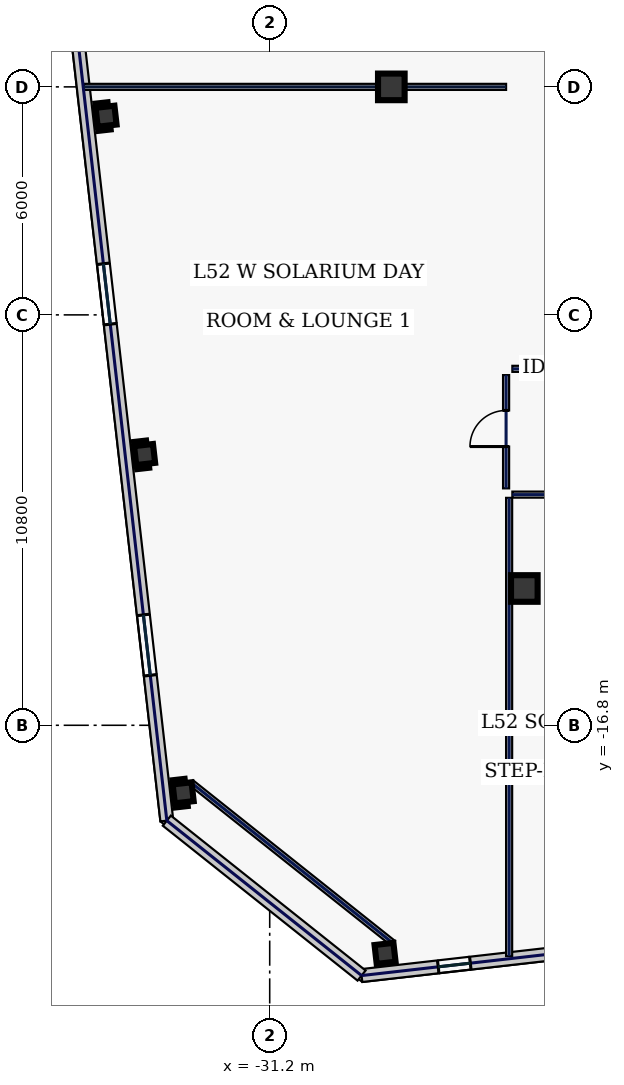
"""IFC4 building model, lengths in metres.
Left out: names, types, materials, properties, quantities, classifications, styles, units other than length and angle.
Written with IfcOpenShell. Run it as: python <this file> out.ifc"""

import sys

from ifc_helpers import new_model, si_unit, direction, frame, frame_2d, origin, origin_2d, place, context, subcontext, project, spatial, rectangle, hollow_rectangle, extrude, element, fill, save


model = new_model("IFC4")
c1 = context("Model", 3, precision=1e-05, world=origin(), true_north=direction((0.0, 1.0)))
c2 = subcontext(c1, "Body", "Model", "MODEL_VIEW")
j1 = project(units=[si_unit("LENGTHUNIT", "METRE"), si_unit("PLANEANGLEUNIT", "RADIAN")], contexts=[c1])
p1 = place(None, origin())
s1 = spatial("IfcSite", under=j1, at=p1, CompositionType="ELEMENT")
p2 = place(p1, origin())
s2 = spatial("IfcBuilding", under=s1, at=p2, CompositionType="ELEMENT")
p3 = place(p2, frame((0.0, 0.0, 226.2)))
s3 = spatial("IfcBuildingStorey", under=s2, at=p3, CompositionType="ELEMENT", Elevation=226.2)
for number, where, z_axis, x_axis in (
    (1, (-24.5, -13.2, 0.0), (0.0, 0.0, 1.0), (1.0, 0.0, 0.0)),
    (2, (-28.0, 0.0, 0.0), (0.0, 0.0, 1.0), (1.0, 0.0, 0.0)),
):
    element("IfcColumn", number, at=place(p3, frame(where, z_axis=z_axis, x_axis=x_axis)), inside=s3, PredefinedType="COLUMN", context=c2, shape_type="SweptSolid", body=[
        extrude(hollow_rectangle(XDim=0.7, YDim=0.7, WallThickness=0.032, at=origin_2d()), origin(), (0.0, 0.0, 1.0), 3.74),
    ])
for number, where, z_axis, x_axis in (
    (3, (-28.165, -22.802, 0.0), (0.0, 0.0, 1.0), (0.994, 0.113, 0.0)),
    (4, (-35.506, -0.772, 0.0), (0.0, 0.0, 1.0), (0.994, 0.113, 0.0)),
    (5, (-34.491, -9.674, 0.0), (0.0, 0.0, 1.0), (0.994, 0.113, 0.0)),
    (6, (-33.477, -18.577, 0.0), (0.0, 0.0, 1.0), (0.994, 0.113, 0.0)),
):
    element("IfcColumn", number, at=place(p3, frame(where, z_axis=z_axis, x_axis=x_axis)), inside=s3, PredefinedType="COLUMN", context=c2, shape_type="SweptSolid", body=[
        extrude(hollow_rectangle(XDim=0.5, YDim=0.5, WallThickness=0.025, at=origin_2d()), origin(), (0.0, 0.0, 1.0), 3.74),
    ])
p4 = place(p3, frame((-28.783, -23.386, 0.0), z_axis=(0.0, 0.0, 1.0), x_axis=(0.993572262951, 0.113199639106, 0.0)))
e7 = element("IfcWall", 7, at=p4, inside=s3, PredefinedType="STANDARD", context=c2, shape_type="SweptSolid", body=[
    extrude(rectangle(XDim=14.15, YDim=0.34, at=frame_2d((7.075, 0.0))), origin(), (0.0, 0.0, 1.0), 3.74),
])
p5 = place(p4, frame((2.03, 0.0, 0.88)))
e8 = element("IfcOpeningElement", 8, at=p5, cuts=e7, PredefinedType="OPENING", context=c2, shape_type="SweptSolid", body=[
    extrude(rectangle(XDim=0.85, YDim=1.85, at=frame_2d((0.425, 0.925))), frame((0.0, 0.18, 0.0), z_axis=(0.0, -1.0, 0.0), x_axis=(1.0, 0.0, 0.0)), (0.0, 0.0, 1.0), 0.36),
])
p6 = place(p4, frame((5.779, 0.0, 0.88)))
e9 = element("IfcOpeningElement", 9, at=p6, cuts=e7, PredefinedType="OPENING", context=c2, shape_type="SweptSolid", body=[
    extrude(rectangle(XDim=1.7, YDim=1.95, at=frame_2d((0.85, 0.975))), frame((0.0, 0.18, 0.0), z_axis=(0.0, -1.0, 0.0), x_axis=(1.0, 0.0, 0.0)), (0.0, 0.0, 1.0), 0.36),
])
p7 = place(p4, frame((10.179, 0.0, 0.88)))
e10 = element("IfcOpeningElement", 10, at=p7, cuts=e7, PredefinedType="OPENING", context=c2, shape_type="SweptSolid", body=[
    extrude(rectangle(XDim=1.7, YDim=1.95, at=frame_2d((0.85, 0.975))), frame((0.0, 0.18, 0.0), z_axis=(0.0, -1.0, 0.0), x_axis=(1.0, 0.0, 0.0)), (0.0, 0.0, 1.0), 0.36),
])
p8 = place(p3, frame((-38.118, 17.651, 0.0), z_axis=(0.0, 0.0, 1.0), x_axis=(0.11320360501, -0.9935718111, 0.0)))
e11 = element("IfcWall", 11, at=p8, inside=s3, PredefinedType="STANDARD", context=c2, shape_type="SweptSolid", body=[
    extrude(rectangle(XDim=37.2, YDim=0.34, at=frame_2d((18.6, 0.0))), origin(), (0.0, 0.0, 1.0), 3.74),
])
p9 = place(p8, frame((3.85, 0.0, 0.58)))
e12 = element("IfcOpeningElement", 12, at=p9, cuts=e11, PredefinedType="OPENING", context=c2, shape_type="SweptSolid", body=[
    extrude(rectangle(XDim=1.6, YDim=2.3, at=frame_2d((0.8, 1.15))), frame((0.0, 0.18, 0.0), z_axis=(0.0, -1.0, 0.0), x_axis=(1.0, 0.0, 0.0)), (0.0, 0.0, 1.0), 0.36),
])
p10 = place(p8, frame((13.15, 0.0, 0.58)))
e13 = element("IfcOpeningElement", 13, at=p10, cuts=e11, PredefinedType="OPENING", context=c2, shape_type="SweptSolid", body=[
    extrude(rectangle(XDim=1.6, YDim=2.3, at=frame_2d((0.8, 1.15))), frame((0.0, 0.18, 0.0), z_axis=(0.0, -1.0, 0.0), x_axis=(1.0, 0.0, 0.0)), (0.0, 0.0, 1.0), 0.36),
])
p11 = place(p8, frame((22.45, 0.0, 0.58)))
e14 = element("IfcOpeningElement", 14, at=p11, cuts=e11, PredefinedType="OPENING", context=c2, shape_type="SweptSolid", body=[
    extrude(rectangle(XDim=1.6, YDim=2.3, at=frame_2d((0.8, 1.15))), frame((0.0, 0.18, 0.0), z_axis=(0.0, -1.0, 0.0), x_axis=(1.0, 0.0, 0.0)), (0.0, 0.0, 1.0), 0.36),
])
p12 = place(p8, frame((31.75, 0.0, 0.58)))
e15 = element("IfcOpeningElement", 15, at=p12, cuts=e11, PredefinedType="OPENING", context=c2, shape_type="SweptSolid", body=[
    extrude(rectangle(XDim=1.6, YDim=2.3, at=frame_2d((0.8, 1.15))), frame((0.0, 0.18, 0.0), z_axis=(0.0, -1.0, 0.0), x_axis=(1.0, 0.0, 0.0)), (0.0, 0.0, 1.0), 0.36),
])
p13 = place(p3, frame((-33.907, -19.31, 0.0), z_axis=(0.0, 0.0, 1.0), x_axis=(0.782611787794, -0.622510071892, 0.0)))
e16 = element("IfcWall", 16, at=p13, inside=s3, PredefinedType="STANDARD", context=c2, shape_type="SweptSolid", body=[
    extrude(rectangle(XDim=6.548, YDim=0.34, at=frame_2d((3.274, 0.0))), origin(), (0.0, 0.0, 1.0), 3.74),
])
p14 = place(p3, frame((-33.265, -18.311, 0.0), z_axis=(0.0, 0.0, 1.0), x_axis=(0.782602647064, -0.622521563328, 0.0)))
e17 = element("IfcWall", 17, at=p14, inside=s3, PredefinedType="PARTITIONING", context=c2, shape_type="SweptSolid", body=[
    extrude(rectangle(XDim=6.788, YDim=0.16, at=frame_2d((3.394, 0.0))), origin(), (0.0, 0.0, 1.0), 3.74),
])
p15 = place(p3, frame((-24.98, -10.565, 0.0), z_axis=(0.0, 0.0, 1.0), x_axis=(0.0, 1.0, 0.0)))
e18 = element("IfcWall", 18, at=p15, inside=s3, PredefinedType="PARTITIONING", context=c2, shape_type="SweptSolid", body=[
    extrude(rectangle(XDim=2.98, YDim=0.16, at=frame_2d((1.49, 0.0))), origin(), (0.0, 0.0, 1.0), 3.74),
])
p16 = place(p15, frame((1.1, 0.0, 0.0)))
e19 = element("IfcOpeningElement", 19, at=p16, cuts=e18, PredefinedType="OPENING", context=c2, shape_type="SweptSolid", body=[
    extrude(rectangle(XDim=0.95, YDim=2.2, at=frame_2d((0.475, 1.1))), frame((0.0, 0.09, 0.0), z_axis=(0.0, -1.0, 0.0), x_axis=(1.0, 0.0, 0.0)), (0.0, 0.0, 1.0), 0.18),
])
p17 = place(p3, frame((-24.815, -7.42, 0.0), z_axis=(0.0, 0.0, 1.0), x_axis=(1.0, 0.0, 0.0)))
e20 = element("IfcWall", 20, at=p17, inside=s3, PredefinedType="PARTITIONING", context=c2, shape_type="SweptSolid", body=[
    extrude(rectangle(XDim=14.1, YDim=0.16, at=frame_2d((7.05, 0.0))), origin(), (0.0, 0.0, 1.0), 3.74),
])
p18 = place(p3, frame((24.815, -10.73, 0.0), z_axis=(0.0, 0.0, 1.0), x_axis=(-1.0, 0.0, 0.0)))
e21 = element("IfcWall", 21, at=p18, inside=s3, PredefinedType="PARTITIONING", context=c2, shape_type="SweptSolid", body=[
    extrude(rectangle(XDim=49.63, YDim=0.16, at=frame_2d((24.815, 0.0))), origin(), (0.0, 0.0, 1.0), 3.74),
])
p19 = place(p18, frame((46.631, 0.0, 0.0)))
e22 = element("IfcOpeningElement", 22, at=p19, cuts=e21, PredefinedType="OPENING", context=c2, shape_type="SweptSolid", body=[
    extrude(rectangle(XDim=1.45, YDim=2.2, at=frame_2d((0.725, 1.1))), frame((0.0, 0.09, 0.0), z_axis=(0.0, -1.0, 0.0), x_axis=(1.0, 0.0, 0.0)), (0.0, 0.0, 1.0), 0.18),
])
p20 = place(p18, frame((42.13, 0.0, 0.0)))
e23 = element("IfcOpeningElement", 23, at=p20, cuts=e21, PredefinedType="OPENING", context=c2, shape_type="SweptSolid", body=[
    extrude(rectangle(XDim=0.95, YDim=2.2, at=frame_2d((0.475, 1.1))), frame((0.0, 0.09, 0.0), z_axis=(0.0, -1.0, 0.0), x_axis=(1.0, 0.0, 0.0)), (0.0, 0.0, 1.0), 0.18),
])
p21 = place(p18, frame((33.74, 0.0, 0.0)))
e24 = element("IfcOpeningElement", 24, at=p21, cuts=e21, PredefinedType="OPENING", context=c2, shape_type="SweptSolid", body=[
    extrude(rectangle(XDim=0.95, YDim=2.2, at=frame_2d((0.475, 1.1))), frame((0.0, 0.09, 0.0), z_axis=(0.0, -1.0, 0.0), x_axis=(1.0, 0.0, 0.0)), (0.0, 0.0, 1.0), 0.18),
])
p22 = place(p18, frame((25.79, 0.0, 0.0)))
e25 = element("IfcOpeningElement", 25, at=p22, cuts=e21, PredefinedType="OPENING", context=c2, shape_type="SweptSolid", body=[
    extrude(rectangle(XDim=1.05, YDim=2.2, at=frame_2d((0.525, 1.1))), frame((0.0, 0.09, 0.0), z_axis=(0.0, -1.0, 0.0), x_axis=(1.0, 0.0, 0.0)), (0.0, 0.0, 1.0), 0.18),
])
p23 = place(p18, frame((16.9, 0.0, 0.0)))
e26 = element("IfcOpeningElement", 26, at=p23, cuts=e21, PredefinedType="OPENING", context=c2, shape_type="SweptSolid", body=[
    extrude(rectangle(XDim=1.3, YDim=2.2, at=frame_2d((0.65, 1.1))), frame((0.0, 0.09, 0.0), z_axis=(0.0, -1.0, 0.0), x_axis=(1.0, 0.0, 0.0)), (0.0, 0.0, 1.0), 0.18),
])
p24 = place(p18, frame((8.4, 0.0, 0.0)))
e27 = element("IfcOpeningElement", 27, at=p24, cuts=e21, PredefinedType="OPENING", context=c2, shape_type="SweptSolid", body=[
    extrude(rectangle(XDim=1.3, YDim=2.2, at=frame_2d((0.65, 1.1))), frame((0.0, 0.09, 0.0), z_axis=(0.0, -1.0, 0.0), x_axis=(1.0, 0.0, 0.0)), (0.0, 0.0, 1.0), 0.18),
])
p25 = place(p18, frame((2.219, 0.0, 0.0)))
e28 = element("IfcOpeningElement", 28, at=p25, cuts=e21, PredefinedType="OPENING", context=c2, shape_type="SweptSolid", body=[
    extrude(rectangle(XDim=0.95, YDim=2.2, at=frame_2d((0.475, 1.1))), frame((0.0, 0.09, 0.0), z_axis=(0.0, -1.0, 0.0), x_axis=(1.0, 0.0, 0.0)), (0.0, 0.0, 1.0), 0.18),
])
p26 = place(p3, frame((-24.9, -22.873, 0.0), z_axis=(0.0, 0.0, 1.0), x_axis=(0.0, 1.0, 0.0)))
e29 = element("IfcWall", 29, at=p26, inside=s3, PredefinedType="PARTITIONING", context=c2, shape_type="SweptSolid", body=[
    extrude(rectangle(XDim=12.058, YDim=0.16, at=frame_2d((6.029, 0.0))), origin(), (0.0, 0.0, 1.0), 3.74),
])
p27 = place(p3, frame((-36.087, 0.0, 0.0), z_axis=(0.0, 0.0, 1.0), x_axis=(1.0, 0.0, 0.0)))
e30 = element("IfcWall", 30, at=p27, inside=s3, PredefinedType="PARTITIONING", context=c2, shape_type="SweptSolid", body=[
    extrude(rectangle(XDim=11.107, YDim=0.16, at=frame_2d((5.553, 0.0))), origin(), (0.0, 0.0, 1.0), 2.135),
])
p28 = place(p5, origin())
e31 = element("IfcWindow", 31, at=p28, inside=s3, PartitioningType="SINGLE_PANEL", PredefinedType="WINDOW", context=c2, shape_type="SweptSolid", body=[
    extrude(rectangle(XDim=0.85, YDim=1.85, at=frame_2d((0.425, 0.925))), frame((0.0, 0.03, 0.0), z_axis=(0.0, -1.0, 0.0), x_axis=(1.0, 0.0, 0.0)), (0.0, 0.0, 1.0), 0.06),
])
fill(e8, e31)
p29 = place(p11, origin())
e32 = element("IfcWindow", 32, at=p29, inside=s3, PartitioningType="SINGLE_PANEL", PredefinedType="WINDOW", context=c2, shape_type="SweptSolid", body=[
    extrude(rectangle(XDim=1.6, YDim=2.3, at=frame_2d((0.8, 1.15))), frame((0.0, 0.03, 0.0), z_axis=(0.0, -1.0, 0.0), x_axis=(1.0, 0.0, 0.0)), (0.0, 0.0, 1.0), 0.06),
])
fill(e14, e32)
p30 = place(p12, origin())
e33 = element("IfcWindow", 33, at=p30, inside=s3, PartitioningType="SINGLE_PANEL", PredefinedType="WINDOW", context=c2, shape_type="SweptSolid", body=[
    extrude(rectangle(XDim=1.6, YDim=2.3, at=frame_2d((0.8, 1.15))), frame((0.0, 0.03, 0.0), z_axis=(0.0, -1.0, 0.0), x_axis=(1.0, 0.0, 0.0)), (0.0, 0.0, 1.0), 0.06),
])
fill(e15, e33)
p31 = place(p16, origin())
e34 = element("IfcDoor", 34, at=p31, inside=s3, OperationType="SINGLE_SWING_LEFT", PredefinedType="DOOR", context=c2, shape_type="SweptSolid", body=[
    extrude(rectangle(XDim=0.95, YDim=2.2, at=frame_2d((0.475, 1.1))), frame((0.0, 0.025, 0.0), z_axis=(0.0, -1.0, 0.0), x_axis=(1.0, 0.0, 0.0)), (0.0, 0.0, 1.0), 0.05),
])
fill(e19, e34)
save(model, sys.argv[1])
